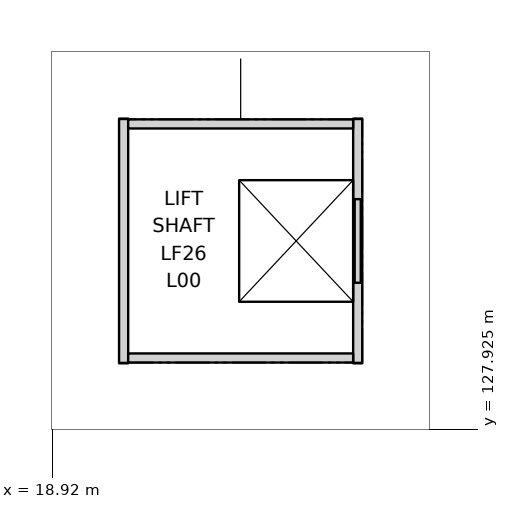
"""IFC4 building model, lengths in metres.
Left out: names, types, materials, properties, quantities, classifications, styles, units other than length and angle.
Written with IfcOpenShell. Run it as: python <this file> out.ifc"""

import sys

from ifc_helpers import new_model, si_unit, direction, frame, frame_2d, origin, place, context, subcontext, project, spatial, rectangle, extrude, element, fill, save


model = new_model("IFC4")
c1 = context("Model", 3, precision=1e-05, world=origin(), true_north=direction((0.0, 1.0)))
c2 = subcontext(c1, "Body", "Model", "MODEL_VIEW")
j1 = project(units=[si_unit("LENGTHUNIT", "METRE"), si_unit("PLANEANGLEUNIT", "RADIAN")], contexts=[c1])
p1 = place(None, origin())
s1 = spatial("IfcSite", under=j1, at=p1, CompositionType="ELEMENT")
p2 = place(p1, origin())
s2 = spatial("IfcBuilding", under=s1, at=p2, CompositionType="ELEMENT")
p3 = place(p2, origin())
s3 = spatial("IfcBuildingStorey", under=s2, at=p3, CompositionType="ELEMENT", Elevation=0.0)
p4 = place(p3, frame((22.94, 128.79, -1.0), z_axis=(0.0, 0.0, 1.0), x_axis=(0.0, 1.0, 0.0)))
e1 = element("IfcWall", 1, at=p4, inside=s3, PredefinedType="PARTITIONING", context=c2, shape_type="SweptSolid", body=[
    extrude(rectangle(XDim=3.22, YDim=0.12, at=frame_2d((1.61, 0.0))), origin(), (0.0, 0.0, 1.0), 8.0),
])
p5 = place(p4, frame((1.06, 0.0, 1.0)))
e2 = element("IfcOpeningElement", 2, at=p5, cuts=e1, PredefinedType="OPENING", context=c2, shape_type="SweptSolid", body=[
    extrude(rectangle(XDim=1.1, YDim=2.1, at=frame_2d((0.55, 1.05))), frame((0.0, 0.07, 0.0), z_axis=(0.0, -1.0, 0.0), x_axis=(1.0, 0.0, 0.0)), (0.0, 0.0, 1.0), 0.14),
])
p6 = place(p3, frame((19.86, 128.79, -1.0), z_axis=(0.0, 0.0, 1.0), x_axis=(0.0, 1.0, 0.0)))
e3 = element("IfcWall", 3, at=p6, inside=s3, PredefinedType="PARTITIONING", context=c2, shape_type="SweptSolid", body=[
    extrude(rectangle(XDim=3.22, YDim=0.12, at=frame_2d((1.61, 0.0))), origin(), (0.0, 0.0, 1.0), 8.0),
])
for number, where, z_axis, x_axis in (
    (4, (19.92, 128.86, -1.0), (0.0, 0.0, 1.0), (1.0, 0.0, 0.0)),
    (5, (19.92, 131.94, -1.0), (0.0, 0.0, 1.0), (1.0, 0.0, 0.0)),
):
    element("IfcWall", number, at=place(p3, frame(where, z_axis=z_axis, x_axis=x_axis)), inside=s3, PredefinedType="PARTITIONING", context=c2, shape_type="SweptSolid", body=[
        extrude(rectangle(XDim=2.96, YDim=0.12, at=frame_2d((1.48, 0.0))), origin(), (0.0, 0.0, 1.0), 8.0),
    ])
p7 = place(p5, origin())
e6 = element("IfcDoor", 6, at=p7, inside=s3, OperationType="DOUBLE_DOOR_SLIDING", PredefinedType="DOOR", context=c2, shape_type="SweptSolid", body=[
    extrude(rectangle(XDim=1.1, YDim=2.1, at=frame_2d((0.55, 1.05))), frame((0.0, 0.025, 0.0), z_axis=(0.0, -1.0, 0.0), x_axis=(1.0, 0.0, 0.0)), (0.0, 0.0, 1.0), 0.05),
])
fill(e2, e6)
save(model, sys.argv[1])
